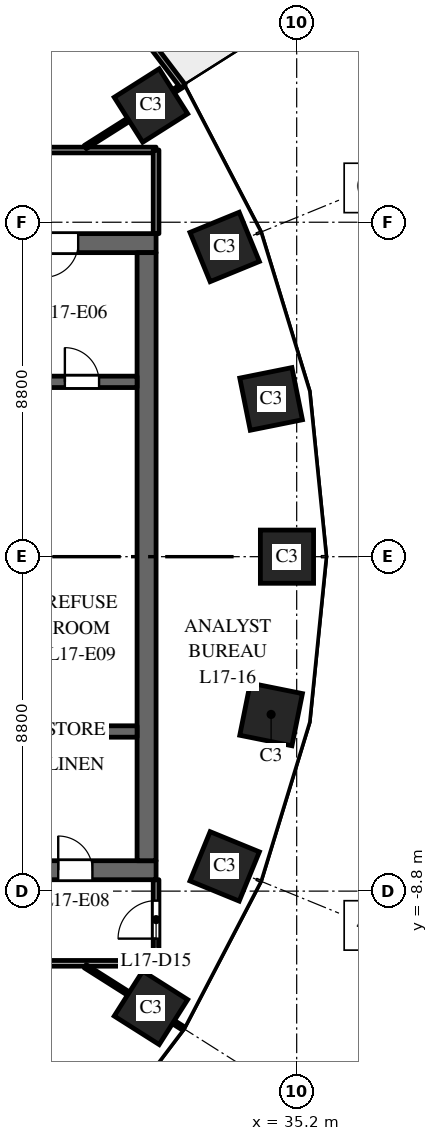
"""IFC4 building model, lengths in metres.
Left out: names, types, materials, properties, quantities, classifications, styles, units other than length and angle.
Written with IfcOpenShell. Run it as: python <this file> out.ifc"""

import sys

from ifc_helpers import new_model, si_unit, direction, frame, frame_2d, origin, origin_2d, place, context, subcontext, project, spatial, rectangle, extrude, element, fill, save


model = new_model("IFC4")
c1 = context("Model", 3, precision=1e-05, world=origin(), true_north=direction((0.0, 1.0)))
c2 = subcontext(c1, "Body", "Model", "MODEL_VIEW")
j1 = project(units=[si_unit("LENGTHUNIT", "METRE"), si_unit("PLANEANGLEUNIT", "RADIAN")], contexts=[c1])
p1 = place(None, origin())
s1 = spatial("IfcSite", under=j1, at=p1, CompositionType="ELEMENT")
p2 = place(p1, origin())
s2 = spatial("IfcBuilding", under=s1, at=p2, CompositionType="ELEMENT")
p3 = place(p2, frame((0.0, 0.0, 78.5)))
s3 = spatial("IfcBuildingStorey", under=s2, at=p3, CompositionType="ELEMENT", Elevation=78.5)
for number, where, z_axis, x_axis in (
    (1, (34.945, 0.0, 0.0), (0.0, 0.0, 1.0), (0.0, 1.0, 0.0)),
    (2, (34.527, 4.151, 0.0), (0.0, 0.0, 1.0), (-0.197, 0.98, 0.0)),
    (3, (33.305, 8.149, 0.0), (0.0, 0.0, 1.0), (-0.379, 0.925, 0.0)),
    (4, (31.365, 11.871, 0.0), (0.0, 0.0, 1.0), (-0.535, 0.845, 0.0)),
    (5, (31.365, -11.871, 0.0), (0.0, 0.0, 1.0), (0.535, 0.845, 0.0)),
    (6, (33.305, -8.149, 0.0), (0.0, 0.0, 1.0), (0.379, 0.925, 0.0)),
    (7, (34.527, -4.151, 0.0), (0.0, 0.0, 1.0), (0.197, 0.98, 0.0)),
):
    element("IfcColumn", number, at=place(p3, frame(where, z_axis=z_axis, x_axis=x_axis)), inside=s3, PredefinedType="COLUMN", context=c2, shape_type="SweptSolid", body=[
        extrude(rectangle(XDim=1.4, YDim=1.4, at=origin_2d()), origin(), (0.0, 0.0, 1.0), 4.0),
    ])
p4 = place(p3, frame((16.5, 8.25, 0.0), z_axis=(0.0, 0.0, 1.0), x_axis=(1.0, 0.0, 0.0)))
e8 = element("IfcWall", 8, at=p4, inside=s3, PredefinedType="SHEAR", context=c2, shape_type="SweptSolid", body=[
    extrude(rectangle(XDim=15.0, YDim=0.5, at=frame_2d((7.5, 0.0))), origin(), (0.0, 0.0, 1.0), 3.7),
])
p5 = place(p4, frame((6.9, 0.0, 0.0)))
e9 = element("IfcOpeningElement", 9, at=p5, cuts=e8, PredefinedType="OPENING", context=c2, shape_type="SweptSolid", body=[
    extrude(rectangle(XDim=1.2, YDim=2.1, at=frame_2d((0.6, 1.05))), frame((0.0, 0.26, 0.0), z_axis=(0.0, -1.0, 0.0), x_axis=(1.0, 0.0, 0.0)), (0.0, 0.0, 1.0), 0.52),
])
p6 = place(p4, frame((12.05, 0.0, 0.0)))
e10 = element("IfcOpeningElement", 10, at=p6, cuts=e8, PredefinedType="OPENING", context=c2, shape_type="SweptSolid", body=[
    extrude(rectangle(XDim=0.9, YDim=2.1, at=frame_2d((0.45, 1.05))), frame((0.0, 0.26, 0.0), z_axis=(0.0, -1.0, 0.0), x_axis=(1.0, 0.0, 0.0)), (0.0, 0.0, 1.0), 0.52),
])
p7 = place(p3, frame((16.5, -8.25, 0.0), z_axis=(0.0, 0.0, 1.0), x_axis=(1.0, 0.0, 0.0)))
e11 = element("IfcWall", 11, at=p7, inside=s3, PredefinedType="SHEAR", context=c2, shape_type="SweptSolid", body=[
    extrude(rectangle(XDim=15.0, YDim=0.5, at=frame_2d((7.5, 0.0))), origin(), (0.0, 0.0, 1.0), 3.7),
])
p8 = place(p7, frame((6.9, 0.0, 0.0)))
e12 = element("IfcOpeningElement", 12, at=p8, cuts=e11, PredefinedType="OPENING", context=c2, shape_type="SweptSolid", body=[
    extrude(rectangle(XDim=1.2, YDim=2.1, at=frame_2d((0.6, 1.05))), frame((0.0, 0.26, 0.0), z_axis=(0.0, -1.0, 0.0), x_axis=(1.0, 0.0, 0.0)), (0.0, 0.0, 1.0), 0.52),
])
p9 = place(p7, frame((12.425, 0.0, 0.0)))
e13 = element("IfcOpeningElement", 13, at=p9, cuts=e11, PredefinedType="OPENING", context=c2, shape_type="SweptSolid", body=[
    extrude(rectangle(XDim=0.9, YDim=2.1, at=frame_2d((0.45, 1.05))), frame((0.0, 0.26, 0.0), z_axis=(0.0, -1.0, 0.0), x_axis=(1.0, 0.0, 0.0)), (0.0, 0.0, 1.0), 0.52),
])
p10 = place(p3, frame((31.25, -8.0, 0.0), z_axis=(0.0, 0.0, 1.0), x_axis=(0.0, 1.0, 0.0)))
e14 = element("IfcWall", 14, at=p10, inside=s3, PredefinedType="SHEAR", context=c2, shape_type="SweptSolid", body=[
    extrude(rectangle(XDim=16.0, YDim=0.5, at=frame_2d((8.0, 0.0))), origin(), (0.0, 0.0, 1.0), 3.7),
])
p11 = place(p3, frame((24.9, 4.6, 0.0), z_axis=(0.0, 0.0, 1.0), x_axis=(1.0, 0.0, 0.0)))
e15 = element("IfcWall", 15, at=p11, inside=s3, PredefinedType="SHEAR", context=c2, shape_type="SweptSolid", body=[
    extrude(rectangle(XDim=6.1, YDim=0.3, at=frame_2d((3.05, 0.0))), origin(), (0.0, 0.0, 1.0), 3.7),
])
p12 = place(p11, frame((4.2, 0.0, 0.0)))
e16 = element("IfcOpeningElement", 16, at=p12, cuts=e15, PredefinedType="OPENING", context=c2, shape_type="SweptSolid", body=[
    extrude(rectangle(XDim=0.9, YDim=2.1, at=frame_2d((0.45, 1.05))), frame((0.0, 0.16, 0.0), z_axis=(0.0, -1.0, 0.0), x_axis=(1.0, 0.0, 0.0)), (0.0, 0.0, 1.0), 0.32),
])
p13 = place(p3, frame((24.9, -4.6, 0.0), z_axis=(0.0, 0.0, 1.0), x_axis=(1.0, 0.0, 0.0)))
e17 = element("IfcWall", 17, at=p13, inside=s3, PredefinedType="SHEAR", context=c2, shape_type="SweptSolid", body=[
    extrude(rectangle(XDim=6.1, YDim=0.3, at=frame_2d((3.05, 0.0))), origin(), (0.0, 0.0, 1.0), 3.7),
])
p14 = place(p3, frame((32.208, 12.374, 0.0), z_axis=(0.0, 0.0, 1.0), x_axis=(-0.604045763106, 0.796949632081, 0.0)))
e18 = element("IfcWall", 18, at=p14, inside=s3, PredefinedType="STANDARD", context=c2, shape_type="SweptSolid", body=[
    extrude(rectangle(XDim=4.423, YDim=0.15, at=frame_2d((2.212, 0.0))), origin(), (0.0, 0.0, 1.0), 3.7),
])
p15 = place(p14, frame((1.712, 0.0, 0.0)))
e19 = element("IfcOpeningElement", 19, at=p15, cuts=e18, PredefinedType="OPENING", context=c2, shape_type="SweptSolid", body=[
    extrude(rectangle(XDim=1.0, YDim=2.4, at=frame_2d((0.5, 1.2))), frame((0.0, 0.085, 0.0), z_axis=(0.0, -1.0, 0.0), x_axis=(1.0, 0.0, 0.0)), (0.0, 0.0, 1.0), 0.17),
])
p16 = place(p3, frame((22.755, -10.7, 0.0), z_axis=(0.0, 0.0, 1.0), x_axis=(1.0, 0.0, 0.0)))
e20 = element("IfcWall", 20, at=p16, inside=s3, PredefinedType="PARTITIONING", context=c2, shape_type="SweptSolid", body=[
    extrude(rectangle(XDim=8.745, YDim=0.15, at=frame_2d((4.373, 0.0))), origin(), (0.0, 0.0, 1.0), 2.85),
])
p17 = place(p16, frame((0.542, 0.0, 0.0)))
e21 = element("IfcOpeningElement", 21, at=p17, cuts=e20, PredefinedType="OPENING", context=c2, shape_type="SweptSolid", body=[
    extrude(rectangle(XDim=1.0, YDim=2.1, at=frame_2d((0.5, 1.05))), frame((0.0, 0.085, 0.0), z_axis=(0.0, -1.0, 0.0), x_axis=(1.0, 0.0, 0.0)), (0.0, 0.0, 1.0), 0.17),
])
p18 = place(p3, frame((22.755, 10.7, 0.0), z_axis=(0.0, 0.0, 1.0), x_axis=(1.0, 0.0, 0.0)))
e22 = element("IfcWall", 22, at=p18, inside=s3, PredefinedType="PARTITIONING", context=c2, shape_type="SweptSolid", body=[
    extrude(rectangle(XDim=8.745, YDim=0.15, at=frame_2d((4.373, 0.0))), origin(), (0.0, 0.0, 1.0), 2.85),
])
p19 = place(p18, frame((0.616, 0.0, 0.0)))
e23 = element("IfcOpeningElement", 23, at=p19, cuts=e22, PredefinedType="OPENING", context=c2, shape_type="SweptSolid", body=[
    extrude(rectangle(XDim=1.0, YDim=2.1, at=frame_2d((0.5, 1.05))), frame((0.0, 0.085, 0.0), z_axis=(0.0, -1.0, 0.0), x_axis=(1.0, 0.0, 0.0)), (0.0, 0.0, 1.0), 0.17),
])
for number, where, z_axis, x_axis in (
    (24, (29.637, -10.777, 0.0), (0.0, 0.0, 1.0), (0.845, -0.535, 0.0)),
    (25, (29.637, 10.777, 0.0), (0.0, 0.0, 1.0), (0.845, 0.535, 0.0)),
):
    element("IfcWall", number, at=place(p3, frame(where, z_axis=z_axis, x_axis=x_axis)), inside=s3, PredefinedType="PARTITIONING", context=c2, shape_type="SweptSolid", body=[
        extrude(rectangle(XDim=3.048, YDim=0.1, at=frame_2d((1.524, 0.0))), origin(), (0.0, 0.0, 1.0), 2.85),
    ])
p20 = place(p3, frame((31.5, -10.7, 0.0), z_axis=(0.0, 0.0, 1.0), x_axis=(0.0, 1.0, 0.0)))
e26 = element("IfcWall", 26, at=p20, inside=s3, PredefinedType="PARTITIONING", context=c2, shape_type="SweptSolid", body=[
    extrude(rectangle(XDim=2.2, YDim=0.15, at=frame_2d((1.1, 0.0))), origin(), (0.0, 0.0, 1.0), 2.85),
])
p21 = place(p20, frame((0.65, 0.0, 0.0)))
e27 = element("IfcOpeningElement", 27, at=p21, cuts=e26, PredefinedType="OPENING", context=c2, shape_type="SweptSolid", body=[
    extrude(rectangle(XDim=1.0, YDim=2.1, at=frame_2d((0.5, 1.05))), frame((0.0, 0.085, 0.0), z_axis=(0.0, -1.0, 0.0), x_axis=(1.0, 0.0, 0.0)), (0.0, 0.0, 1.0), 0.17),
])
p22 = place(p3, frame((31.5, 8.5, 0.0), z_axis=(0.0, 0.0, 1.0), x_axis=(0.0, 1.0, 0.0)))
e28 = element("IfcWall", 28, at=p22, inside=s3, PredefinedType="PARTITIONING", context=c2, shape_type="SweptSolid", body=[
    extrude(rectangle(XDim=2.2, YDim=0.15, at=frame_2d((1.1, 0.0))), origin(), (0.0, 0.0, 1.0), 2.85),
])
p23 = place(p6, origin())
e29 = element("IfcDoor", 29, at=p23, inside=s3, OperationType="SINGLE_SWING_LEFT", PredefinedType="DOOR", context=c2, shape_type="SweptSolid", body=[
    extrude(rectangle(XDim=0.9, YDim=2.1, at=frame_2d((0.45, 1.05))), frame((0.0, 0.025, 0.0), z_axis=(0.0, -1.0, 0.0), x_axis=(1.0, 0.0, 0.0)), (0.0, 0.0, 1.0), 0.05),
])
fill(e10, e29)
p24 = place(p9, origin())
e30 = element("IfcDoor", 30, at=p24, inside=s3, OperationType="SINGLE_SWING_RIGHT", PredefinedType="DOOR", context=c2, shape_type="SweptSolid", body=[
    extrude(rectangle(XDim=0.9, YDim=2.1, at=frame_2d((0.45, 1.05))), frame((0.0, 0.025, 0.0), z_axis=(0.0, -1.0, 0.0), x_axis=(1.0, 0.0, 0.0)), (0.0, 0.0, 1.0), 0.05),
])
fill(e13, e30)
p25 = place(p12, origin())
e31 = element("IfcDoor", 31, at=p25, inside=s3, OperationType="SINGLE_SWING_RIGHT", PredefinedType="DOOR", context=c2, shape_type="SweptSolid", body=[
    extrude(rectangle(XDim=0.9, YDim=2.1, at=frame_2d((0.45, 1.05))), frame((0.0, 0.025, 0.0), z_axis=(0.0, -1.0, 0.0), x_axis=(1.0, 0.0, 0.0)), (0.0, 0.0, 1.0), 0.05),
])
fill(e16, e31)
p26 = place(p21, origin())
e32 = element("IfcDoor", 32, at=p26, inside=s3, OperationType="SINGLE_SWING_LEFT", PredefinedType="DOOR", context=c2, shape_type="SweptSolid", body=[
    extrude(rectangle(XDim=1.0, YDim=2.1, at=frame_2d((0.5, 1.05))), frame((0.0, 0.025, 0.0), z_axis=(0.0, -1.0, 0.0), x_axis=(1.0, 0.0, 0.0)), (0.0, 0.0, 1.0), 0.05),
])
fill(e27, e32)
save(model, sys.argv[1])
